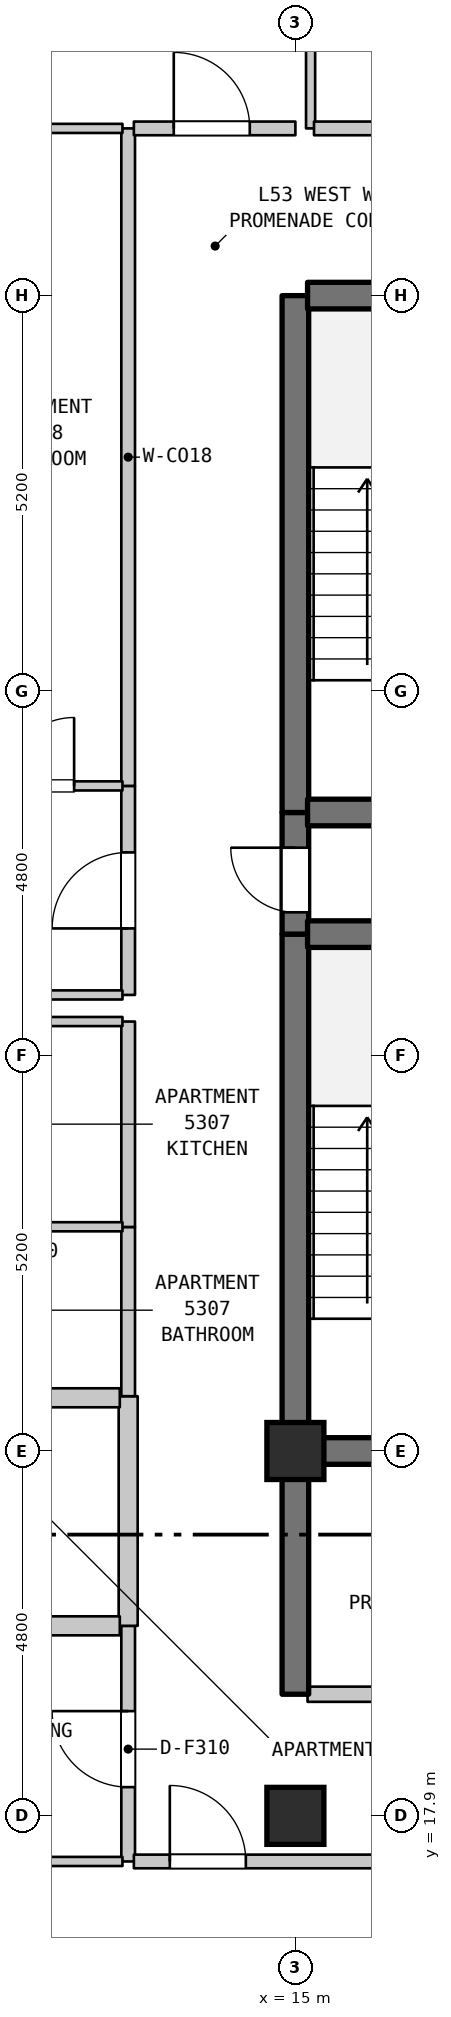
"""IFC4 building model, lengths in metres.
Left out: names, types, materials, properties, quantities, classifications, styles, units other than length and angle.
Written with IfcOpenShell. Run it as: python <this file> out.ifc"""

import sys

from ifc_helpers import new_model, si_unit, direction, frame, frame_2d, origin, origin_2d, place, context, subcontext, project, spatial, rectangle, extrude, element, fill, save


model = new_model("IFC4")
c1 = context("Model", 3, precision=1e-05, world=origin(), true_north=direction((0.0, 1.0)))
c2 = subcontext(c1, "Body", "Model", "MODEL_VIEW")
j1 = project(units=[si_unit("LENGTHUNIT", "METRE"), si_unit("PLANEANGLEUNIT", "RADIAN")], contexts=[c1])
p1 = place(None, origin())
s1 = spatial("IfcSite", under=j1, at=p1, CompositionType="ELEMENT")
p2 = place(p1, origin())
s2 = spatial("IfcBuilding", under=s1, at=p2, CompositionType="ELEMENT")
p3 = place(p2, frame((0.0, 0.0, 214.3)))
s3 = spatial("IfcBuildingStorey", under=s2, at=p3, CompositionType="ELEMENT", Elevation=214.3)
for number, where, z_axis, x_axis in (
    (1, (15.0, 17.9, 0.0), (0.0, 0.0, 1.0), (1.0, 0.0, 0.0)),
    (2, (15.0, 22.7, 0.0), (0.0, 0.0, 1.0), (1.0, 0.0, 0.0)),
):
    element("IfcColumn", number, at=place(p3, frame(where, z_axis=z_axis, x_axis=x_axis)), inside=s3, PredefinedType="COLUMN", context=c2, shape_type="SweptSolid", body=[
        extrude(rectangle(XDim=0.75, YDim=0.75, at=origin_2d()), origin(), (0.0, 0.0, 1.0), 3.7),
    ])
p4 = place(p3, frame((12.8, 17.3, 0.0), z_axis=(0.0, 0.0, 1.0), x_axis=(0.0, 1.0, 0.0)))
e3 = element("IfcWall", 3, at=p4, inside=s3, PredefinedType="STANDARD", context=c2, shape_type="SweptSolid", body=[
    extrude(rectangle(XDim=3.1, YDim=0.18, at=frame_2d((1.55, 0.0))), origin(), (0.0, 0.0, 1.0), 3.38),
])
p5 = place(p4, frame((0.978, 0.0, 0.0)))
e4 = element("IfcOpeningElement", 4, at=p5, cuts=e3, PredefinedType="OPENING", context=c2, shape_type="SweptSolid", body=[
    extrude(rectangle(XDim=1.0, YDim=2.15, at=frame_2d((0.5, 1.075))), frame((0.0, 0.1, 0.0), z_axis=(0.0, -1.0, 0.0), x_axis=(1.0, 0.0, 0.0)), (0.0, 0.0, 1.0), 0.2),
])
p6 = place(p3, frame((12.8, 20.4, 0.0), z_axis=(0.0, 0.0, 1.0), x_axis=(0.0, 1.0, 0.0)))
e5 = element("IfcWall", 5, at=p6, inside=s3, PredefinedType="STANDARD", context=c2, shape_type="SweptSolid", body=[
    extrude(rectangle(XDim=3.021, YDim=0.25, at=frame_2d((1.51, 0.0))), origin(), (0.0, 0.0, 1.0), 3.38),
])
p7 = place(p3, frame((12.8, 23.421, 0.0), z_axis=(0.0, 0.0, 1.0), x_axis=(0.0, 1.0, 0.0)))
e6 = element("IfcWall", 6, at=p7, inside=s3, PredefinedType="STANDARD", context=c2, shape_type="SweptSolid", body=[
    extrude(rectangle(XDim=2.226, YDim=0.18, at=frame_2d((1.113, 0.0))), origin(), (0.0, 0.0, 1.0), 3.38),
])
p8 = place(p3, frame((12.8, 25.647, 0.0), z_axis=(0.0, 0.0, 1.0), x_axis=(0.0, 1.0, 0.0)))
e7 = element("IfcWall", 7, at=p8, inside=s3, PredefinedType="STANDARD", context=c2, shape_type="SweptSolid", body=[
    extrude(rectangle(XDim=2.703, YDim=0.18, at=frame_2d((1.352, 0.0))), origin(), (0.0, 0.0, 1.0), 3.38),
])
p9 = place(p3, frame((12.8, 28.7, 0.0), z_axis=(0.0, 0.0, 1.0), x_axis=(0.0, 1.0, 0.0)))
e8 = element("IfcWall", 8, at=p9, inside=s3, PredefinedType="STANDARD", context=c2, shape_type="SweptSolid", body=[
    extrude(rectangle(XDim=2.75, YDim=0.18, at=frame_2d((1.375, 0.0))), origin(), (0.0, 0.0, 1.0), 3.38),
])
p10 = place(p9, frame((0.875, 0.0, 0.0)))
e9 = element("IfcOpeningElement", 9, at=p10, cuts=e8, PredefinedType="OPENING", context=c2, shape_type="SweptSolid", body=[
    extrude(rectangle(XDim=1.0, YDim=2.15, at=frame_2d((0.5, 1.075))), frame((0.0, 0.1, 0.0), z_axis=(0.0, -1.0, 0.0), x_axis=(1.0, 0.0, 0.0)), (0.0, 0.0, 1.0), 0.2),
])
p11 = place(p3, frame((12.8, 31.45, 0.0), z_axis=(0.0, 0.0, 1.0), x_axis=(0.0, 1.0, 0.0)))
e10 = element("IfcWall", 10, at=p11, inside=s3, PredefinedType="STANDARD", context=c2, shape_type="SweptSolid", body=[
    extrude(rectangle(XDim=8.65, YDim=0.18, at=frame_2d((4.325, 0.0))), origin(), (0.0, 0.0, 1.0), 3.38),
])
p12 = place(p3, frame((15.0, 19.5, 0.0), z_axis=(0.0, 0.0, 1.0), x_axis=(0.0, 1.0, 0.0)))
e11 = element("IfcWall", 11, at=p12, inside=s3, PredefinedType="SHEAR", context=c2, shape_type="SweptSolid", body=[
    extrude(rectangle(XDim=3.2, YDim=0.35, at=frame_2d((1.6, 0.0))), origin(), (0.0, 0.0, 1.0), 3.38),
])
p13 = place(p3, frame((15.0, 22.7, 0.0), z_axis=(0.0, 0.0, 1.0), x_axis=(0.0, 1.0, 0.0)))
e12 = element("IfcWall", 12, at=p13, inside=s3, PredefinedType="SHEAR", context=c2, shape_type="SweptSolid", body=[
    extrude(rectangle(XDim=6.8, YDim=0.35, at=frame_2d((3.4, 0.0))), origin(), (0.0, 0.0, 1.0), 3.38),
])
p14 = place(p3, frame((15.0, 29.5, 0.0), z_axis=(0.0, 0.0, 1.0), x_axis=(0.0, 1.0, 0.0)))
e13 = element("IfcWall", 13, at=p14, inside=s3, PredefinedType="SHEAR", context=c2, shape_type="SweptSolid", body=[
    extrude(rectangle(XDim=1.6, YDim=0.35, at=frame_2d((0.8, 0.0))), origin(), (0.0, 0.0, 1.0), 3.38),
])
p15 = place(p14, frame((0.287, 0.0, 0.0)))
e14 = element("IfcOpeningElement", 14, at=p15, cuts=e13, PredefinedType="OPENING", context=c2, shape_type="SweptSolid", body=[
    extrude(rectangle(XDim=0.85, YDim=2.1, at=frame_2d((0.425, 1.05))), frame((0.0, 0.185, 0.0), z_axis=(0.0, -1.0, 0.0), x_axis=(1.0, 0.0, 0.0)), (0.0, 0.0, 1.0), 0.37),
])
p16 = place(p3, frame((15.0, 31.1, 0.0), z_axis=(0.0, 0.0, 1.0), x_axis=(0.0, 1.0, 0.0)))
e15 = element("IfcWall", 15, at=p16, inside=s3, PredefinedType="SHEAR", context=c2, shape_type="SweptSolid", body=[
    extrude(rectangle(XDim=6.8, YDim=0.35, at=frame_2d((3.4, 0.0))), origin(), (0.0, 0.0, 1.0), 3.38),
])
p17 = place(p3, frame((15.2, 40.1, 0.0), z_axis=(0.0, 0.0, 1.0), x_axis=(0.0, 1.0, 0.0)))
e16 = element("IfcWall", 16, at=p17, inside=s3, PredefinedType="PARTITIONING", context=c2, shape_type="SweptSolid", body=[
    extrude(rectangle(XDim=3.2, YDim=0.12, at=frame_2d((1.6, 0.0))), origin(), (0.0, 0.0, 1.0), 3.38),
])
p18 = place(p3, frame((9.085, 17.3, 0.0), z_axis=(0.0, 0.0, 1.0), x_axis=(1.0, 0.0, 0.0)))
e17 = element("IfcWall", 17, at=p18, inside=s3, PredefinedType="PARTITIONING", context=c2, shape_type="SweptSolid", body=[
    extrude(rectangle(XDim=3.64, YDim=0.12, at=frame_2d((1.82, 0.0))), origin(), (0.0, 0.0, 1.0), 3.38),
])
p19 = place(p3, frame((12.875, 17.3, 0.0), z_axis=(0.0, 0.0, 1.0), x_axis=(1.0, 0.0, 0.0)))
e18 = element("IfcWall", 18, at=p19, inside=s3, PredefinedType="STANDARD", context=c2, shape_type="SweptSolid", body=[
    extrude(rectangle(XDim=3.58, YDim=0.18, at=frame_2d((1.79, 0.0))), origin(), (0.0, 0.0, 1.0), 3.38),
])
p20 = place(p19, frame((0.473, 0.0, 0.0)))
e19 = element("IfcOpeningElement", 19, at=p20, cuts=e18, PredefinedType="OPENING", context=c2, shape_type="SweptSolid", body=[
    extrude(rectangle(XDim=1.0, YDim=2.15, at=frame_2d((0.5, 1.075))), frame((0.0, 0.1, 0.0), z_axis=(0.0, -1.0, 0.0), x_axis=(1.0, 0.0, 0.0)), (0.0, 0.0, 1.0), 0.2),
])
p21 = place(p3, frame((15.16, 19.5, 0.0), z_axis=(0.0, 0.0, 1.0), x_axis=(1.0, 0.0, 0.0)))
e20 = element("IfcWall", 20, at=p21, inside=s3, PredefinedType="STANDARD", context=c2, shape_type="SweptSolid", body=[
    extrude(rectangle(XDim=3.68, YDim=0.2, at=frame_2d((1.84, 0.0))), origin(), (0.0, 0.0, 1.0), 3.38),
])
p22 = place(p21, frame((1.39, 0.0, 0.0)))
e21 = element("IfcOpeningElement", 21, at=p22, cuts=e20, PredefinedType="OPENING", context=c2, shape_type="SweptSolid", body=[
    extrude(rectangle(XDim=0.9, YDim=2.15, at=frame_2d((0.45, 1.075))), frame((0.0, 0.11, 0.0), z_axis=(0.0, -1.0, 0.0), x_axis=(1.0, 0.0, 0.0)), (0.0, 0.0, 1.0), 0.22),
])
p23 = place(p3, frame((10.66, 20.4, 0.0), z_axis=(0.0, 0.0, 1.0), x_axis=(1.0, 0.0, 0.0)))
e22 = element("IfcWall", 22, at=p23, inside=s3, PredefinedType="STANDARD", context=c2, shape_type="SweptSolid", body=[
    extrude(rectangle(XDim=2.03, YDim=0.25, at=frame_2d((1.015, 0.0))), origin(), (0.0, 0.0, 1.0), 3.38),
])
p24 = place(p3, frame((15.16, 22.7, 0.0), z_axis=(0.0, 0.0, 1.0), x_axis=(1.0, 0.0, 0.0)))
e23 = element("IfcWall", 23, at=p24, inside=s3, PredefinedType="SHEAR", context=c2, shape_type="SweptSolid", body=[
    extrude(rectangle(XDim=3.68, YDim=0.35, at=frame_2d((1.84, 0.0))), origin(), (0.0, 0.0, 1.0), 3.38),
])
p25 = place(p3, frame((10.66, 23.4, 0.0), z_axis=(0.0, 0.0, 1.0), x_axis=(1.0, 0.0, 0.0)))
e24 = element("IfcWall", 24, at=p25, inside=s3, PredefinedType="STANDARD", context=c2, shape_type="SweptSolid", body=[
    extrude(rectangle(XDim=2.03, YDim=0.25, at=frame_2d((1.015, 0.0))), origin(), (0.0, 0.0, 1.0), 3.38),
])
for number, where, z_axis, x_axis in (
    (25, (10.595, 25.65, 0.0), (0.0, 0.0, 1.0), (1.0, 0.0, 0.0)),
    (26, (10.595, 28.35, 0.0), (0.0, 0.0, 1.0), (1.0, 0.0, 0.0)),
):
    element("IfcWall", number, at=place(p3, frame(where, z_axis=z_axis, x_axis=x_axis)), inside=s3, PredefinedType="PARTITIONING", context=c2, shape_type="SweptSolid", body=[
        extrude(rectangle(XDim=2.13, YDim=0.12, at=frame_2d((1.065, 0.0))), origin(), (0.0, 0.0, 1.0), 3.38),
    ])
p26 = place(p3, frame((9.03, 28.7, 0.0), z_axis=(0.0, 0.0, 1.0), x_axis=(1.0, 0.0, 0.0)))
e27 = element("IfcWall", 27, at=p26, inside=s3, PredefinedType="PARTITIONING", context=c2, shape_type="SweptSolid", body=[
    extrude(rectangle(XDim=3.695, YDim=0.12, at=frame_2d((1.848, 0.0))), origin(), (0.0, 0.0, 1.0), 3.38),
])
for number, where, z_axis, x_axis in (
    (28, (15.16, 29.5, 0.0), (0.0, 0.0, 1.0), (1.0, 0.0, 0.0)),
    (29, (15.16, 31.1, 0.0), (0.0, 0.0, 1.0), (1.0, 0.0, 0.0)),
):
    element("IfcWall", number, at=place(p3, frame(where, z_axis=z_axis, x_axis=x_axis)), inside=s3, PredefinedType="SHEAR", context=c2, shape_type="SweptSolid", body=[
        extrude(rectangle(XDim=3.68, YDim=0.35, at=frame_2d((1.84, 0.0))), origin(), (0.0, 0.0, 1.0), 3.38),
    ])
p27 = place(p3, frame((10.523, 31.45, 0.0), z_axis=(0.0, 0.0, 1.0), x_axis=(1.0, 0.0, 0.0)))
e30 = element("IfcWall", 30, at=p27, inside=s3, PredefinedType="PARTITIONING", context=c2, shape_type="SweptSolid", body=[
    extrude(rectangle(XDim=2.202, YDim=0.12, at=frame_2d((1.101, 0.0))), origin(), (0.0, 0.0, 1.0), 3.38),
])
p28 = place(p27, frame((0.666, 0.0, 0.0)))
e31 = element("IfcOpeningElement", 31, at=p28, cuts=e30, PredefinedType="OPENING", context=c2, shape_type="SweptSolid", body=[
    extrude(rectangle(XDim=0.9, YDim=2.1, at=frame_2d((0.45, 1.05))), frame((0.0, 0.07, 0.0), z_axis=(0.0, -1.0, 0.0), x_axis=(1.0, 0.0, 0.0)), (0.0, 0.0, 1.0), 0.14),
])
p29 = place(p3, frame((15.16, 37.9, 0.0), z_axis=(0.0, 0.0, 1.0), x_axis=(1.0, 0.0, 0.0)))
e32 = element("IfcWall", 32, at=p29, inside=s3, PredefinedType="SHEAR", context=c2, shape_type="SweptSolid", body=[
    extrude(rectangle(XDim=3.68, YDim=0.35, at=frame_2d((1.84, 0.0))), origin(), (0.0, 0.0, 1.0), 3.38),
])
p30 = place(p3, frame((10.523, 40.1, 0.0), z_axis=(0.0, 0.0, 1.0), x_axis=(1.0, 0.0, 0.0)))
e33 = element("IfcWall", 33, at=p30, inside=s3, PredefinedType="PARTITIONING", context=c2, shape_type="SweptSolid", body=[
    extrude(rectangle(XDim=2.202, YDim=0.12, at=frame_2d((1.101, 0.0))), origin(), (0.0, 0.0, 1.0), 3.38),
])
p31 = place(p3, frame((12.875, 40.1, 0.0), z_axis=(0.0, 0.0, 1.0), x_axis=(1.0, 0.0, 0.0)))
e34 = element("IfcWall", 34, at=p31, inside=s3, PredefinedType="STANDARD", context=c2, shape_type="SweptSolid", body=[
    extrude(rectangle(XDim=2.125, YDim=0.18, at=frame_2d((1.062, 0.0))), origin(), (0.0, 0.0, 1.0), 3.38),
])
p32 = place(p31, frame((0.525, 0.0, 0.0)))
e35 = element("IfcOpeningElement", 35, at=p32, cuts=e34, PredefinedType="OPENING", context=c2, shape_type="SweptSolid", body=[
    extrude(rectangle(XDim=1.0, YDim=2.15, at=frame_2d((0.5, 1.075))), frame((0.0, 0.1, 0.0), z_axis=(0.0, -1.0, 0.0), x_axis=(1.0, 0.0, 0.0)), (0.0, 0.0, 1.0), 0.2),
])
p33 = place(p3, frame((15.245, 40.1, 0.0), z_axis=(0.0, 0.0, 1.0), x_axis=(1.0, 0.0, 0.0)))
e36 = element("IfcWall", 36, at=p33, inside=s3, PredefinedType="STANDARD", context=c2, shape_type="SweptSolid", body=[
    extrude(rectangle(XDim=2.26, YDim=0.18, at=frame_2d((1.13, 0.0))), origin(), (0.0, 0.0, 1.0), 3.38),
])
p34 = place(p5, origin())
e37 = element("IfcDoor", 37, at=p34, inside=s3, OperationType="SINGLE_SWING_RIGHT", PredefinedType="DOOR", context=c2, shape_type="SweptSolid", body=[
    extrude(rectangle(XDim=1.0, YDim=2.15, at=frame_2d((0.5, 1.075))), frame((0.0, 0.025, 0.0), z_axis=(0.0, -1.0, 0.0), x_axis=(1.0, 0.0, 0.0)), (0.0, 0.0, 1.0), 0.05),
])
fill(e4, e37)
p35 = place(p10, origin())
e38 = element("IfcDoor", 38, at=p35, inside=s3, OperationType="SINGLE_SWING_LEFT", PredefinedType="DOOR", context=c2, shape_type="SweptSolid", body=[
    extrude(rectangle(XDim=1.0, YDim=2.15, at=frame_2d((0.5, 1.075))), frame((0.0, 0.025, 0.0), z_axis=(0.0, -1.0, 0.0), x_axis=(1.0, 0.0, 0.0)), (0.0, 0.0, 1.0), 0.05),
])
fill(e9, e38)
p36 = place(p15, origin())
e39 = element("IfcDoor", 39, at=p36, inside=s3, OperationType="SINGLE_SWING_RIGHT", PredefinedType="DOOR", context=c2, shape_type="SweptSolid", body=[
    extrude(rectangle(XDim=0.85, YDim=2.1, at=frame_2d((0.425, 1.05))), frame((0.0, 0.025, 0.0), z_axis=(0.0, -1.0, 0.0), x_axis=(1.0, 0.0, 0.0)), (0.0, 0.0, 1.0), 0.05),
])
fill(e14, e39)
p37 = place(p20, origin())
e40 = element("IfcDoor", 40, at=p37, inside=s3, OperationType="SINGLE_SWING_LEFT", PredefinedType="DOOR", context=c2, shape_type="SweptSolid", body=[
    extrude(rectangle(XDim=1.0, YDim=2.15, at=frame_2d((0.5, 1.075))), frame((0.0, 0.025, 0.0), z_axis=(0.0, -1.0, 0.0), x_axis=(1.0, 0.0, 0.0)), (0.0, 0.0, 1.0), 0.05),
])
fill(e19, e40)
p38 = place(p28, origin())
e41 = element("IfcDoor", 41, at=p38, inside=s3, OperationType="SINGLE_SWING_RIGHT", PredefinedType="DOOR", context=c2, shape_type="SweptSolid", body=[
    extrude(rectangle(XDim=0.9, YDim=2.1, at=frame_2d((0.45, 1.05))), frame((0.0, 0.025, 0.0), z_axis=(0.0, -1.0, 0.0), x_axis=(1.0, 0.0, 0.0)), (0.0, 0.0, 1.0), 0.05),
])
fill(e31, e41)
p39 = place(p32, origin())
e42 = element("IfcDoor", 42, at=p39, inside=s3, OperationType="SINGLE_SWING_LEFT", PredefinedType="DOOR", context=c2, shape_type="SweptSolid", body=[
    extrude(rectangle(XDim=1.0, YDim=2.15, at=frame_2d((0.5, 1.075))), frame((0.0, 0.025, 0.0), z_axis=(0.0, -1.0, 0.0), x_axis=(1.0, 0.0, 0.0)), (0.0, 0.0, 1.0), 0.05),
])
fill(e35, e42)
save(model, sys.argv[1])
